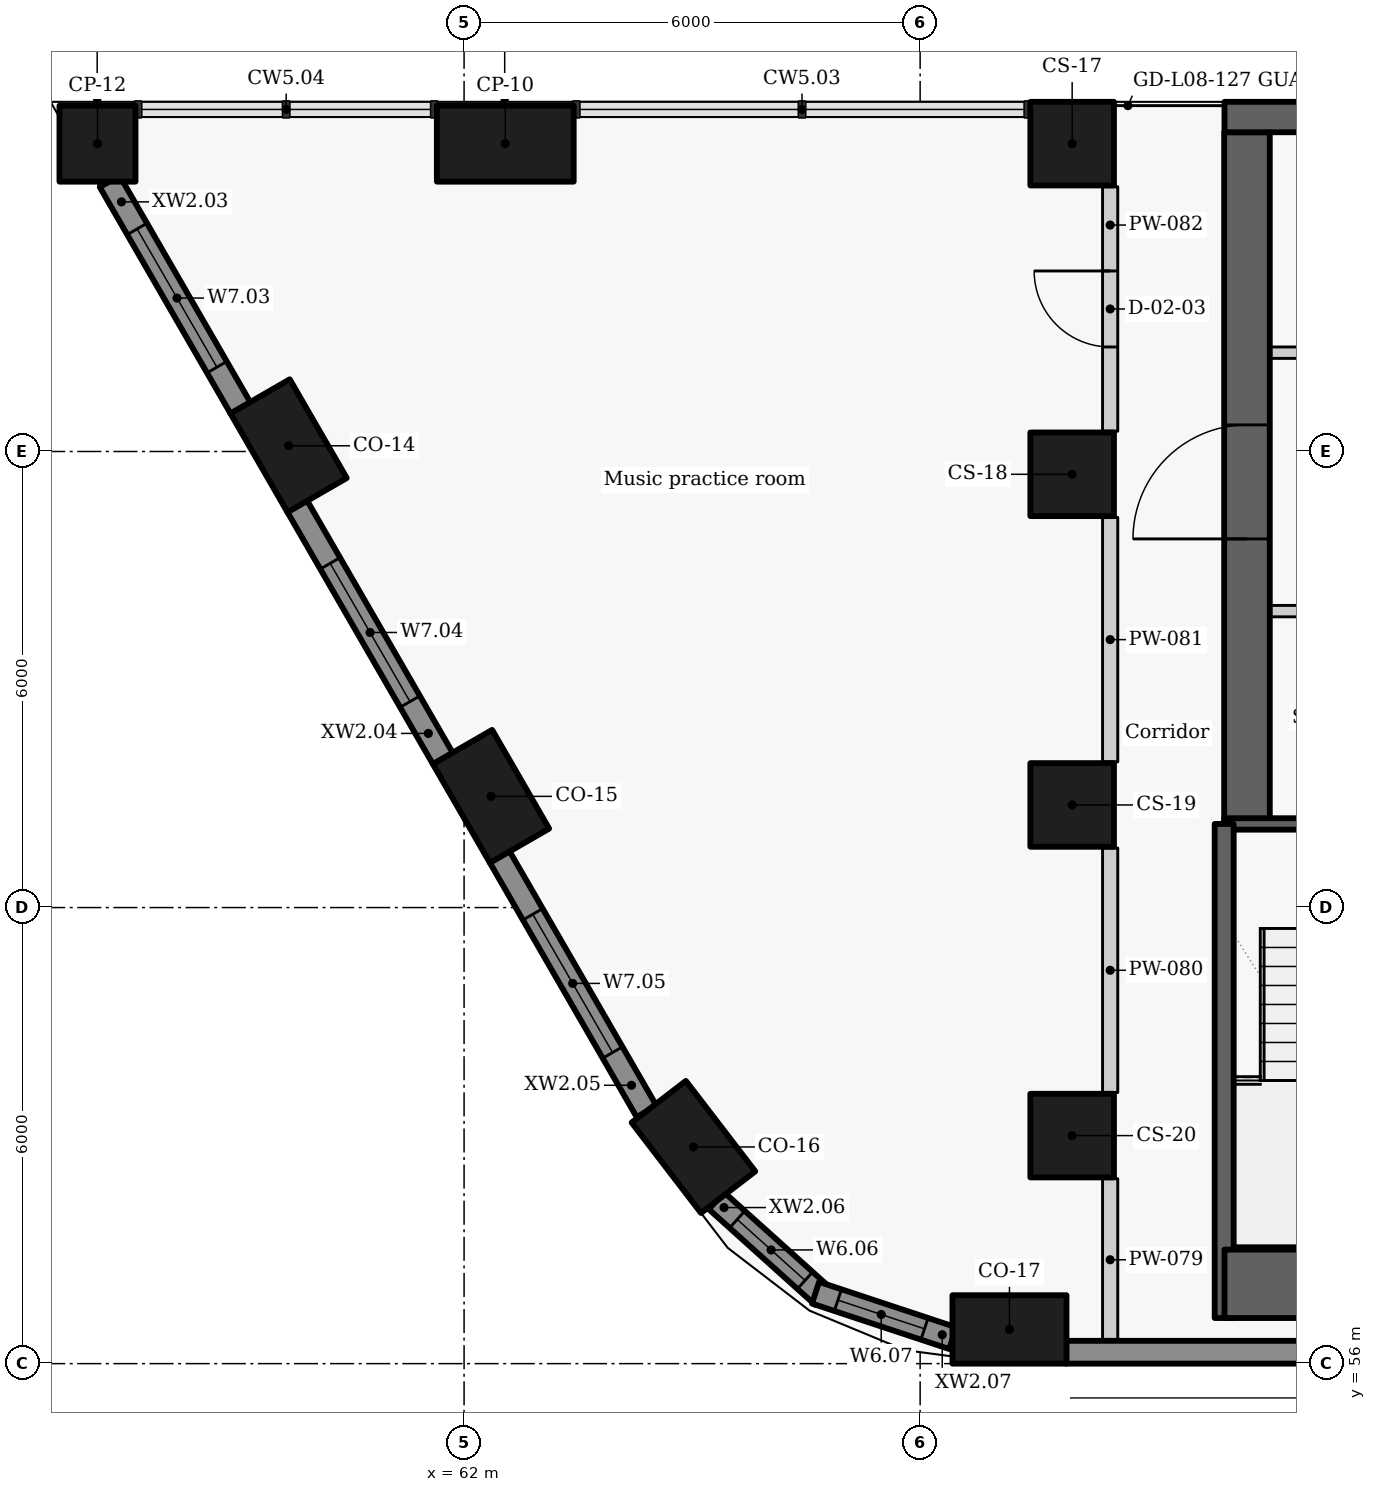
"""IFC4 building model, lengths in metres.
Left out: names, types, materials, properties, quantities, classifications, styles, units other than length and angle.
Written with IfcOpenShell. Run it as: python <this file> out.ifc"""

import sys

from ifc_helpers import new_model, si_unit, direction, frame, frame_2d, origin, origin_2d, place, context, subcontext, project, spatial, rectangle, extrude, element, fill, save


model = new_model("IFC4")
c1 = context("Model", 3, precision=1e-05, world=origin(), true_north=direction((0.0, 1.0)))
c2 = subcontext(c1, "Body", "Model", "MODEL_VIEW")
j1 = project(units=[si_unit("LENGTHUNIT", "METRE"), si_unit("PLANEANGLEUNIT", "RADIAN")], contexts=[c1])
p1 = place(None, origin())
s1 = spatial("IfcSite", under=j1, at=p1, CompositionType="ELEMENT")
p2 = place(p1, origin())
s2 = spatial("IfcBuilding", under=s1, at=p2, CompositionType="ELEMENT")
p3 = place(p2, frame((0.0, 0.0, 34.8)))
s3 = spatial("IfcBuildingStorey", under=s2, at=p3, CompositionType="ELEMENT", Elevation=34.8)
for number, where, z_axis, x_axis in (
    (1, (59.692, 68.075, 0.0), (0.0, 0.0, 1.0), (0.5, -0.866, 0.0)),
    (2, (62.354, 63.463, 0.0), (0.0, 0.0, 1.0), (0.5, -0.866, 0.0)),
    (3, (65.018, 58.851, 0.0), (0.0, 0.0, 1.0), (0.609, -0.793, 0.0)),
    (4, (69.175, 56.45, 0.0), (0.0, 0.0, 1.0), (1.0, 0.0, 0.0)),
):
    element("IfcColumn", number, at=place(p3, frame(where, z_axis=z_axis, x_axis=x_axis)), inside=s3, PredefinedType="COLUMN", context=c2, shape_type="SweptSolid", body=[
        extrude(rectangle(XDim=1.5, YDim=0.9, at=origin_2d()), origin(), (0.0, 0.0, 1.0), 3.3),
    ])
for number, where, z_axis, x_axis in (
    (5, (70.0, 72.05, 0.0), (0.0, 0.0, 1.0), (0.0, -1.0, 0.0)),
    (6, (70.0, 67.7, 0.0), (0.0, 0.0, 1.0), (0.0, -1.0, 0.0)),
    (7, (70.0, 63.35, 0.0), (0.0, 0.0, 1.0), (0.0, -1.0, 0.0)),
    (8, (70.0, 59.0, 0.0), (0.0, 0.0, 1.0), (0.0, -1.0, 0.0)),
):
    element("IfcColumn", number, at=place(p3, frame(where, z_axis=z_axis, x_axis=x_axis)), inside=s3, PredefinedType="COLUMN", context=c2, shape_type="SweptSolid", body=[
        extrude(rectangle(XDim=1.1, YDim=1.1, at=origin_2d()), origin(), (0.0, 0.0, 1.0), 3.3),
    ])
p4 = place(p3, frame((62.542, 72.05, 0.0), z_axis=(0.0, 0.0, 1.0), x_axis=(1.0, 0.0, 0.0)))
e9 = element("IfcColumn", 9, at=p4, inside=s3, PredefinedType="COLUMN", context=c2, shape_type="SweptSolid", body=[
    extrude(rectangle(XDim=1.8, YDim=1.0, at=origin_2d()), origin(), (0.0, 0.0, 1.0), 3.3),
])
p5 = place(p3, frame((57.177, 72.05, 0.0), z_axis=(0.0, 0.0, 1.0), x_axis=(1.0, 0.0, 0.0)))
e10 = element("IfcColumn", 10, at=p5, inside=s3, PredefinedType="COLUMN", context=c2, shape_type="SweptSolid", body=[
    extrude(rectangle(XDim=1.0, YDim=1.0, at=origin_2d()), origin(), (0.0, 0.0, 1.0), 3.3),
])
p6 = place(p3, frame((57.337, 71.553, 0.0), z_axis=(0.0, 0.0, 1.0), x_axis=(0.500035437112, -0.866004943191, 0.0)))
e11 = element("IfcWall", 11, at=p6, inside=s3, PredefinedType="SOLIDWALL", context=c2, shape_type="SweptSolid", body=[
    extrude(rectangle(XDim=3.444, YDim=0.3, at=frame_2d((1.722, 0.0))), origin(), (0.0, 0.0, 1.0), 2.3),
])
p7 = place(p6, frame((0.722, 0.0, 0.9)))
e12 = element("IfcOpeningElement", 12, at=p7, cuts=e11, PredefinedType="OPENING", context=c2, shape_type="SweptSolid", body=[
    extrude(rectangle(XDim=2.1, YDim=1.1, at=frame_2d((1.05, 0.55))), frame((0.0, 0.16, 0.0), z_axis=(0.0, -1.0, 0.0), x_axis=(1.0, 0.0, 0.0)), (0.0, 0.0, 1.0), 0.32),
])
p8 = place(p3, frame((59.805, 67.279, 0.0), z_axis=(0.0, 0.0, 1.0), x_axis=(0.500001735503, -0.866024401789, 0.0)))
e13 = element("IfcWall", 13, at=p8, inside=s3, PredefinedType="SOLIDWALL", context=c2, shape_type="SweptSolid", body=[
    extrude(rectangle(XDim=3.834, YDim=0.3, at=frame_2d((1.917, 0.0))), origin(), (0.0, 0.0, 1.0), 2.3),
])
p9 = place(p8, frame((0.867, 0.0, 0.9)))
e14 = element("IfcOpeningElement", 14, at=p9, cuts=e13, PredefinedType="OPENING", context=c2, shape_type="SweptSolid", body=[
    extrude(rectangle(XDim=2.1, YDim=1.1, at=frame_2d((1.05, 0.55))), frame((0.0, 0.16, 0.0), z_axis=(0.0, -1.0, 0.0), x_axis=(1.0, 0.0, 0.0)), (0.0, 0.0, 1.0), 0.32),
])
p10 = place(p3, frame((62.468, 62.667, 0.0), z_axis=(0.0, 0.0, 1.0), x_axis=(0.499948341072, -0.866055227026, 0.0)))
e15 = element("IfcWall", 15, at=p10, inside=s3, PredefinedType="SOLIDWALL", context=c2, shape_type="SweptSolid", body=[
    extrude(rectangle(XDim=3.867, YDim=0.3, at=frame_2d((1.934, 0.0))), origin(), (0.0, 0.0, 1.0), 2.3),
])
p11 = place(p10, frame((0.872, 0.0, 0.9)))
e16 = element("IfcOpeningElement", 16, at=p11, cuts=e15, PredefinedType="OPENING", context=c2, shape_type="SweptSolid", body=[
    extrude(rectangle(XDim=2.1, YDim=1.1, at=frame_2d((1.05, 0.55))), frame((0.0, 0.16, 0.0), z_axis=(0.0, -1.0, 0.0), x_axis=(1.0, 0.0, 0.0)), (0.0, 0.0, 1.0), 0.32),
])
p12 = place(p3, frame((65.32, 58.143, 0.0), z_axis=(0.0, 0.0, 1.0), x_axis=(0.7435526378, -0.668677407141, 0.0)))
e17 = element("IfcWall", 17, at=p12, inside=s3, PredefinedType="SOLIDWALL", context=c2, shape_type="SweptSolid", body=[
    extrude(rectangle(XDim=1.878, YDim=0.3, at=frame_2d((0.939, 0.0))), origin(), (0.0, 0.0, 1.0), 2.3),
])
p13 = place(p12, frame((0.367, 0.0, 0.9)))
e18 = element("IfcOpeningElement", 18, at=p13, cuts=e17, PredefinedType="OPENING", context=c2, shape_type="SweptSolid", body=[
    extrude(rectangle(XDim=1.2, YDim=1.1, at=frame_2d((0.6, 0.55))), frame((0.0, 0.16, 0.0), z_axis=(0.0, -1.0, 0.0), x_axis=(1.0, 0.0, 0.0)), (0.0, 0.0, 1.0), 0.32),
])
p14 = place(p3, frame((66.624, 56.933, 0.0), z_axis=(0.0, 0.0, 1.0), x_axis=(0.949246659442, -0.314532636683, 0.0)))
e19 = element("IfcWall", 19, at=p14, inside=s3, PredefinedType="SOLIDWALL", context=c2, shape_type="SweptSolid", body=[
    extrude(rectangle(XDim=1.902, YDim=0.3, at=frame_2d((0.951, 0.0))), origin(), (0.0, 0.0, 1.0), 2.3),
])
p15 = place(p14, frame((0.31, 0.0, 0.9)))
e20 = element("IfcOpeningElement", 20, at=p15, cuts=e19, PredefinedType="OPENING", context=c2, shape_type="SweptSolid", body=[
    extrude(rectangle(XDim=1.2, YDim=1.1, at=frame_2d((0.6, 0.55))), frame((0.0, 0.16, 0.0), z_axis=(0.0, -1.0, 0.0), x_axis=(1.0, 0.0, 0.0)), (0.0, 0.0, 1.0), 0.32),
])
p16 = place(p3, frame((69.921, 56.15, 0.0), z_axis=(0.0, 0.0, 1.0), x_axis=(1.0, 0.0, 0.0)))
e21 = element("IfcWall", 21, at=p16, inside=s3, PredefinedType="SOLIDWALL", context=c2, shape_type="SweptSolid", body=[
    extrude(rectangle(XDim=19.84, YDim=0.3, at=frame_2d((9.92, 0.0))), origin(), (0.0, 0.0, 1.0), 2.3),
])
p17 = place(p3, frame((72.0, 69.3, 0.0), z_axis=(0.0, 0.0, 1.0), x_axis=(1.0, 0.0, 0.0)))
e22 = element("IfcWall", 22, at=p17, inside=s3, PredefinedType="PARTITIONING", context=c2, shape_type="SweptSolid", body=[
    extrude(rectangle(XDim=2.6, YDim=0.15, at=frame_2d((1.3, 0.0))), origin(), (0.0, 0.0, 1.0), 2.9),
])
p18 = place(p17, frame((1.175, 0.0, 0.0)))
e23 = element("IfcOpeningElement", 23, at=p18, cuts=e22, PredefinedType="OPENING", context=c2, shape_type="SweptSolid", body=[
    extrude(rectangle(XDim=0.9, YDim=2.1, at=frame_2d((0.45, 1.05))), frame((0.0, 0.085, 0.0), z_axis=(0.0, -1.0, 0.0), x_axis=(1.0, 0.0, 0.0)), (0.0, 0.0, 1.0), 0.17),
])
p19 = place(p3, frame((72.3, 63.1, -0.275), z_axis=(0.0, 0.0, 1.0), x_axis=(0.0, 1.0, 0.0)))
e24 = element("IfcWall", 24, at=p19, inside=s3, PredefinedType="SHEAR", context=c2, shape_type="SweptSolid", body=[
    extrude(rectangle(XDim=9.1, YDim=0.6, at=frame_2d((4.55, 0.0))), origin(), (0.0, 0.0, 1.0), 3.175),
])
p20 = place(p19, frame((3.75, 0.0, 0.275)))
e25 = element("IfcOpeningElement", 25, at=p20, cuts=e24, PredefinedType="OPENING", context=c2, shape_type="SweptSolid", body=[
    extrude(rectangle(XDim=1.5, YDim=2.1, at=frame_2d((0.75, 1.05))), frame((0.0, 0.31, 0.0), z_axis=(0.0, -1.0, 0.0), x_axis=(1.0, 0.0, 0.0)), (0.0, 0.0, 1.0), 0.62),
])
p21 = place(p3, frame((74.603, 65.9, 0.0), z_axis=(0.0, 0.0, 1.0), x_axis=(-1.0, 0.0, 0.0)))
e26 = element("IfcWall", 26, at=p21, inside=s3, PredefinedType="PARTITIONING", context=c2, shape_type="SweptSolid", body=[
    extrude(rectangle(XDim=2.603, YDim=0.15, at=frame_2d((1.302, 0.0))), origin(), (0.0, 0.0, 1.0), 2.9),
])
p22 = place(p21, frame((0.428, 0.0, 0.0)))
e27 = element("IfcOpeningElement", 27, at=p22, cuts=e26, PredefinedType="OPENING", context=c2, shape_type="SweptSolid", body=[
    extrude(rectangle(XDim=1.1, YDim=2.1, at=frame_2d((0.55, 1.05))), frame((0.0, 0.085, 0.0), z_axis=(0.0, -1.0, 0.0), x_axis=(1.0, 0.0, 0.0)), (0.0, 0.0, 1.0), 0.17),
])
p23 = place(p3, frame((72.0, 63.1, -0.275), z_axis=(0.0, 0.0, 1.0), x_axis=(1.0, 0.0, 0.0)))
e28 = element("IfcWall", 28, at=p23, inside=s3, PredefinedType="SHEAR", context=c2, shape_type="SweptSolid", body=[
    extrude(rectangle(XDim=2.6, YDim=0.15, at=frame_2d((1.3, 0.0))), origin(), (0.0, 0.0, 1.0), 3.175),
])
p24 = place(p23, frame((1.02, 0.0, 0.275)))
e29 = element("IfcOpeningElement", 29, at=p24, cuts=e28, PredefinedType="OPENING", context=c2, shape_type="SweptSolid", body=[
    extrude(rectangle(XDim=1.1, YDim=2.1, at=frame_2d((0.55, 1.05))), frame((0.0, 0.085, 0.0), z_axis=(0.0, -1.0, 0.0), x_axis=(1.0, 0.0, 0.0)), (0.0, 0.0, 1.0), 0.17),
])
p25 = place(p3, frame((72.0, 56.6, -0.275), z_axis=(0.0, 0.0, 1.0), x_axis=(0.0, 1.0, 0.0)))
e30 = element("IfcWall", 30, at=p25, inside=s3, PredefinedType="SHEAR", context=c2, shape_type="SweptSolid", body=[
    extrude(rectangle(XDim=6.5, YDim=0.25, at=frame_2d((3.25, 0.0))), origin(), (0.0, 0.0, 1.0), 3.175),
])
p26 = place(p3, frame((70.5, 56.3, 0.0), z_axis=(0.0, 0.0, 1.0), x_axis=(0.0, 1.0, 0.0)))
e31 = element("IfcWall", 31, at=p26, inside=s3, PredefinedType="PARTITIONING", context=c2, shape_type="SweptSolid", body=[
    extrude(rectangle(XDim=2.133, YDim=0.2, at=frame_2d((1.066, 0.0))), origin(), (0.0, 0.0, 1.0), 2.9),
])
for number, where, z_axis, x_axis in (
    (32, (70.5, 59.567, 0.0), (0.0, 0.0, 1.0), (0.0, 1.0, 0.0)),
    (33, (70.5, 63.917, 0.0), (0.0, 0.0, 1.0), (0.0, 1.0, 0.0)),
):
    element("IfcWall", number, at=place(p3, frame(where, z_axis=z_axis, x_axis=x_axis)), inside=s3, PredefinedType="PARTITIONING", context=c2, shape_type="SweptSolid", body=[
        extrude(rectangle(XDim=3.216, YDim=0.2, at=frame_2d((1.608, 0.0))), origin(), (0.0, 0.0, 1.0), 2.9),
    ])
p27 = place(p3, frame((70.5, 68.267, 0.0), z_axis=(0.0, 0.0, 1.0), x_axis=(0.0, 1.0, 0.0)))
e34 = element("IfcWall", 34, at=p27, inside=s3, PredefinedType="PARTITIONING", context=c2, shape_type="SweptSolid", body=[
    extrude(rectangle(XDim=3.216, YDim=0.2, at=frame_2d((1.608, 0.0))), origin(), (0.0, 0.0, 1.0), 2.9),
])
p28 = place(p27, frame((1.108, 0.0, 0.0)))
e35 = element("IfcOpeningElement", 35, at=p28, cuts=e34, PredefinedType="OPENING", context=c2, shape_type="SweptSolid", body=[
    extrude(rectangle(XDim=1.0, YDim=2.1, at=frame_2d((0.5, 1.05))), frame((0.0, 0.11, 0.0), z_axis=(0.0, -1.0, 0.0), x_axis=(1.0, 0.0, 0.0)), (0.0, 0.0, 1.0), 0.22),
])
p29 = place(p3, frame((72.004, 72.4, -0.275), z_axis=(0.0, 0.0, 1.0), x_axis=(1.0, 0.0, 0.0)))
e36 = element("IfcWall", 36, at=p29, inside=s3, PredefinedType="SHEAR", context=c2, shape_type="SweptSolid", body=[
    extrude(rectangle(XDim=15.992, YDim=0.4, at=frame_2d((7.996, 0.0))), origin(), (0.0, 0.0, 1.0), 3.175),
])
p30 = place(p3, frame((72.004, 57.05, -0.275), z_axis=(0.0, 0.0, 1.0), x_axis=(1.0, 0.0, 0.0)))
e37 = element("IfcWall", 37, at=p30, inside=s3, PredefinedType="SHEAR", context=c2, shape_type="SweptSolid", body=[
    extrude(rectangle(XDim=15.992, YDim=0.9, at=frame_2d((7.996, 0.0))), origin(), (0.0, 0.0, 1.0), 3.175),
])
p31 = place(p7, origin())
e38 = element("IfcWindow", 38, at=p31, inside=s3, PartitioningType="SINGLE_PANEL", PredefinedType="WINDOW", context=c2, shape_type="SweptSolid", body=[
    extrude(rectangle(XDim=2.1, YDim=1.1, at=frame_2d((1.05, 0.55))), frame((0.0, 0.03, 0.0), z_axis=(0.0, -1.0, 0.0), x_axis=(1.0, 0.0, 0.0)), (0.0, 0.0, 1.0), 0.06),
])
fill(e12, e38)
p32 = place(p9, origin())
e39 = element("IfcWindow", 39, at=p32, inside=s3, PartitioningType="SINGLE_PANEL", PredefinedType="WINDOW", context=c2, shape_type="SweptSolid", body=[
    extrude(rectangle(XDim=2.1, YDim=1.1, at=frame_2d((1.05, 0.55))), frame((0.0, 0.03, 0.0), z_axis=(0.0, -1.0, 0.0), x_axis=(1.0, 0.0, 0.0)), (0.0, 0.0, 1.0), 0.06),
])
fill(e14, e39)
p33 = place(p11, origin())
e40 = element("IfcWindow", 40, at=p33, inside=s3, PartitioningType="SINGLE_PANEL", PredefinedType="WINDOW", context=c2, shape_type="SweptSolid", body=[
    extrude(rectangle(XDim=2.1, YDim=1.1, at=frame_2d((1.05, 0.55))), frame((0.0, 0.03, 0.0), z_axis=(0.0, -1.0, 0.0), x_axis=(1.0, 0.0, 0.0)), (0.0, 0.0, 1.0), 0.06),
])
fill(e16, e40)
p34 = place(p13, origin())
e41 = element("IfcWindow", 41, at=p34, inside=s3, PartitioningType="SINGLE_PANEL", PredefinedType="WINDOW", context=c2, shape_type="SweptSolid", body=[
    extrude(rectangle(XDim=1.2, YDim=1.1, at=frame_2d((0.6, 0.55))), frame((0.0, 0.03, 0.0), z_axis=(0.0, -1.0, 0.0), x_axis=(1.0, 0.0, 0.0)), (0.0, 0.0, 1.0), 0.06),
])
fill(e18, e41)
p35 = place(p15, origin())
e42 = element("IfcWindow", 42, at=p35, inside=s3, PartitioningType="SINGLE_PANEL", PredefinedType="WINDOW", context=c2, shape_type="SweptSolid", body=[
    extrude(rectangle(XDim=1.2, YDim=1.1, at=frame_2d((0.6, 0.55))), frame((0.0, 0.03, 0.0), z_axis=(0.0, -1.0, 0.0), x_axis=(1.0, 0.0, 0.0)), (0.0, 0.0, 1.0), 0.06),
])
fill(e20, e42)
p36 = place(p28, origin())
e43 = element("IfcDoor", 43, at=p36, inside=s3, OperationType="SINGLE_SWING_RIGHT", PredefinedType="DOOR", context=c2, shape_type="SweptSolid", body=[
    extrude(rectangle(XDim=1.0, YDim=2.1, at=frame_2d((0.5, 1.05))), frame((0.0, 0.025, 0.0), z_axis=(0.0, -1.0, 0.0), x_axis=(1.0, 0.0, 0.0)), (0.0, 0.0, 1.0), 0.05),
])
fill(e35, e43)
p37 = place(p20, origin())
e44 = element("IfcDoor", 44, at=p37, inside=s3, OperationType="DOUBLE_DOOR_SINGLE_SWING", PredefinedType="DOOR", context=c2, shape_type="SweptSolid", body=[
    extrude(rectangle(XDim=1.5, YDim=2.1, at=frame_2d((0.75, 1.05))), frame((0.0, 0.025, 0.0), z_axis=(0.0, -1.0, 0.0), x_axis=(1.0, 0.0, 0.0)), (0.0, 0.0, 1.0), 0.05),
])
fill(e25, e44)
save(model, sys.argv[1])
